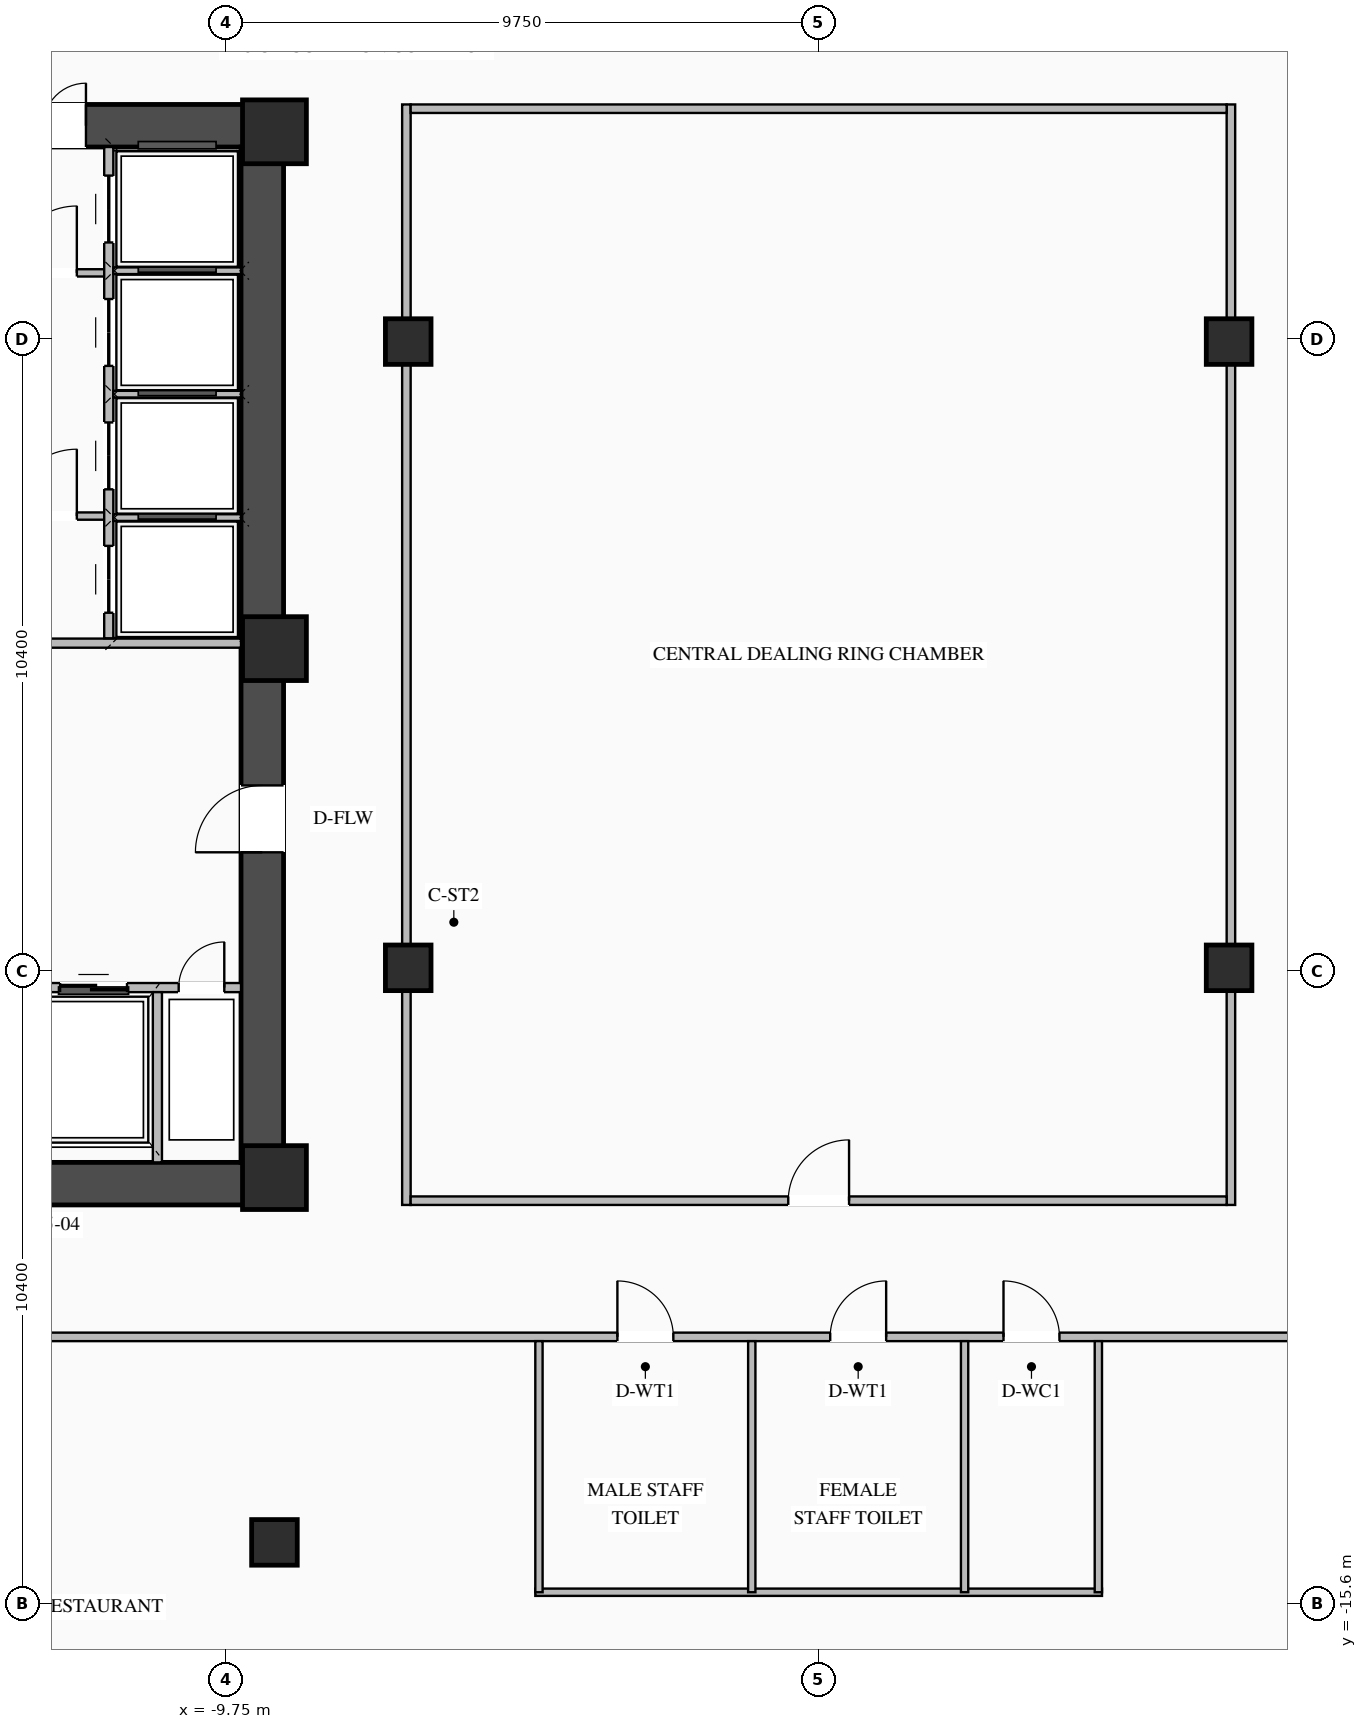
"""IFC4 building model, lengths in metres.
Left out: names, types, materials, properties, quantities, classifications, styles, units other than length and angle.
Written with IfcOpenShell. Run it as: python <this file> out.ifc"""

import sys

from ifc_helpers import new_model, si_unit, direction, frame, frame_2d, origin, origin_2d, place, context, subcontext, project, spatial, rectangle, i_section, extrude, element, fill, save


model = new_model("IFC4")
c1 = context("Model", 3, precision=1e-05, world=origin(), true_north=direction((0.0, 1.0)))
c2 = subcontext(c1, "Body", "Model", "MODEL_VIEW")
j1 = project(units=[si_unit("LENGTHUNIT", "METRE"), si_unit("PLANEANGLEUNIT", "RADIAN")], contexts=[c1])
p1 = place(None, origin())
s1 = spatial("IfcSite", under=j1, at=p1, CompositionType="ELEMENT")
p2 = place(p1, origin())
s2 = spatial("IfcBuilding", under=s1, at=p2, CompositionType="ELEMENT")
p3 = place(p2, frame((0.0, 0.0, 70.0)))
s3 = spatial("IfcBuildingStorey", under=s2, at=p3, CompositionType="ELEMENT", Elevation=70.0)
p4 = place(p3, frame((-19.05, -8.7, 0.0), z_axis=(0.0, 0.0, 1.0), x_axis=(1.0, 0.0, 0.0)))
e1 = element("IfcWall", 1, at=p4, inside=s3, PredefinedType="SHEAR", context=c2, shape_type="SweptSolid", body=[
    extrude(rectangle(XDim=10.25, YDim=0.7, at=frame_2d((5.125, 0.0))), origin(), (0.0, 0.0, 1.0), 4.02),
])
p5 = place(p3, frame((-19.05, 8.7, 0.0), z_axis=(0.0, 0.0, 1.0), x_axis=(1.0, 0.0, 0.0)))
e2 = element("IfcWall", 2, at=p5, inside=s3, PredefinedType="SHEAR", context=c2, shape_type="SweptSolid", body=[
    extrude(rectangle(XDim=10.25, YDim=0.7, at=frame_2d((5.125, 0.0))), origin(), (0.0, 0.0, 1.0), 4.02),
])
p6 = place(p5, frame((5.6, 0.0, 0.0)))
e3 = element("IfcOpeningElement", 3, at=p6, cuts=e2, PredefinedType="OPENING", context=c2, shape_type="SweptSolid", body=[
    extrude(rectangle(XDim=1.4, YDim=2.05, at=frame_2d((0.7, 1.025))), frame((0.0, 0.36, 0.0), z_axis=(0.0, -1.0, 0.0), x_axis=(1.0, 0.0, 0.0)), (0.0, 0.0, 1.0), 0.72),
])
p7 = place(p3, frame((-9.15, -8.35, 0.0), z_axis=(0.0, 0.0, 1.0), x_axis=(0.0, 1.0, 0.0)))
e4 = element("IfcWall", 4, at=p7, inside=s3, PredefinedType="SHEAR", context=c2, shape_type="SweptSolid", body=[
    extrude(rectangle(XDim=16.7, YDim=0.7, at=frame_2d((8.35, 0.0))), origin(), (0.0, 0.0, 1.0), 4.02),
])
p8 = place(p7, frame((5.1, 0.0, 0.0)))
e5 = element("IfcOpeningElement", 5, at=p8, cuts=e4, PredefinedType="OPENING", context=c2, shape_type="SweptSolid", body=[
    extrude(rectangle(XDim=1.1, YDim=2.08, at=frame_2d((0.55, 1.04))), frame((0.0, 0.36, 0.0), z_axis=(0.0, -1.0, 0.0), x_axis=(1.0, 0.0, 0.0)), (0.0, 0.0, 1.0), 0.72),
])
for number, where, z_axis, x_axis in (
    (6, (-8.95, -8.6, 0.0), (0.0, 0.0, 1.0), (1.0, 0.0, 0.0)),
    (7, (-8.95, 0.1, 0.0), (0.0, 0.0, 1.0), (1.0, 0.0, 0.0)),
    (8, (-8.95, 8.6, 0.0), (0.0, 0.0, 1.0), (1.0, 0.0, 0.0)),
):
    element("IfcColumn", number, at=place(p3, frame(where, z_axis=z_axis, x_axis=x_axis)), inside=s3, PredefinedType="COLUMN", context=c2, shape_type="SweptSolid", body=[
        extrude(rectangle(XDim=1.05, YDim=1.05, at=origin_2d()), origin(), (0.0, 0.0, 1.0), 4.2),
    ])
for number, where, z_axis, x_axis in (
    (9, (-6.75, -5.15, 0.0), (0.0, 0.0, 1.0), (1.0, 0.0, 0.0)),
    (10, (-6.75, 5.15, 0.0), (0.0, 0.0, 1.0), (1.0, 0.0, 0.0)),
    (11, (6.75, -5.15, 0.0), (0.0, 0.0, 1.0), (1.0, 0.0, 0.0)),
    (12, (6.75, 5.15, 0.0), (0.0, 0.0, 1.0), (1.0, 0.0, 0.0)),
    (13, (-8.95, -14.6, 0.0), (0.0, 0.0, 1.0), (1.0, 0.0, 0.0)),
):
    element("IfcColumn", number, at=place(p3, frame(where, z_axis=z_axis, x_axis=x_axis)), inside=s3, PredefinedType="COLUMN", context=c2, shape_type="SweptSolid", body=[
        extrude(i_section(OverallWidth=0.75, OverallDepth=0.75, WebThickness=0.03, FlangeThickness=0.044, at=origin_2d()), origin(), (0.0, 0.0, 1.0), 4.2),
    ])
p9 = place(p3, frame((-12.895, -5.475, 0.0), z_axis=(0.0, 0.0, 1.0), x_axis=(1.0, 0.0, 0.0)))
e14 = element("IfcWall", 14, at=p9, inside=s3, PredefinedType="STANDARD", context=c2, shape_type="SweptSolid", body=[
    extrude(rectangle(XDim=3.395, YDim=0.15, at=frame_2d((1.698, 0.0))), origin(), (0.0, 0.0, 1.0), 4.0),
])
p10 = place(p9, frame((0.42, 0.0, 0.0)))
e15 = element("IfcOpeningElement", 15, at=p10, cuts=e14, PredefinedType="OPENING", context=c2, shape_type="SweptSolid", body=[
    extrude(rectangle(XDim=1.1, YDim=2.15, at=frame_2d((0.55, 1.075))), frame((0.0, 0.085, 0.0), z_axis=(0.0, -1.0, 0.0), x_axis=(1.0, 0.0, 0.0)), (0.0, 0.0, 1.0), 0.17),
])
p11 = place(p9, frame((2.37, 0.0, 0.0)))
e16 = element("IfcOpeningElement", 16, at=p11, cuts=e14, PredefinedType="OPENING", context=c2, shape_type="SweptSolid", body=[
    extrude(rectangle(XDim=0.75, YDim=2.05, at=frame_2d((0.375, 1.025))), frame((0.0, 0.085, 0.0), z_axis=(0.0, -1.0, 0.0), x_axis=(1.0, 0.0, 0.0)), (0.0, 0.0, 1.0), 0.17),
])
p12 = place(p3, frame((-10.875, -8.35, 0.0), z_axis=(0.0, 0.0, 1.0), x_axis=(0.0, 1.0, 0.0)))
e17 = element("IfcWall", 17, at=p12, inside=s3, PredefinedType="STANDARD", context=c2, shape_type="SweptSolid", body=[
    extrude(rectangle(XDim=2.8, YDim=0.15, at=frame_2d((1.4, 0.0))), origin(), (0.0, 0.0, 1.0), 4.0),
])
p13 = place(p3, frame((-12.89, 0.19, 0.0), z_axis=(0.0, 0.0, 1.0), x_axis=(1.0, 0.0, 0.0)))
e18 = element("IfcWall", 18, at=p13, inside=s3, PredefinedType="STANDARD", context=c2, shape_type="SweptSolid", body=[
    extrude(rectangle(XDim=3.39, YDim=0.15, at=frame_2d((1.695, 0.0))), origin(), (0.0, 0.0, 1.0), 3.395),
])
p14 = place(p3, frame((-13.75, 2.28, 0.0), z_axis=(0.0, 0.0, 1.0), x_axis=(1.0, 0.0, 0.0)))
e19 = element("IfcWall", 19, at=p14, inside=s3, PredefinedType="STANDARD", context=c2, shape_type="SweptSolid", body=[
    extrude(rectangle(XDim=2.0, YDim=0.12, at=frame_2d((1.0, 0.0))), origin(), (0.0, 0.0, 1.0), 4.0),
])
p15 = place(p14, frame((0.45, 0.0, 0.0)))
e20 = element("IfcOpeningElement", 20, at=p15, cuts=e19, PredefinedType="OPENING", context=c2, shape_type="SweptSolid", body=[
    extrude(rectangle(XDim=1.1, YDim=2.1, at=frame_2d((0.55, 1.05))), frame((0.0, 0.07, 0.0), z_axis=(0.0, -1.0, 0.0), x_axis=(1.0, 0.0, 0.0)), (0.0, 0.0, 1.0), 0.14),
])
p16 = place(p3, frame((-13.75, 6.28, 0.0), z_axis=(0.0, 0.0, 1.0), x_axis=(1.0, 0.0, 0.0)))
e21 = element("IfcWall", 21, at=p16, inside=s3, PredefinedType="STANDARD", context=c2, shape_type="SweptSolid", body=[
    extrude(rectangle(XDim=2.0, YDim=0.12, at=frame_2d((1.0, 0.0))), origin(), (0.0, 0.0, 1.0), 4.0),
])
p17 = place(p16, frame((0.45, 0.0, 0.0)))
e22 = element("IfcOpeningElement", 22, at=p17, cuts=e21, PredefinedType="OPENING", context=c2, shape_type="SweptSolid", body=[
    extrude(rectangle(XDim=1.1, YDim=2.1, at=frame_2d((0.55, 1.05))), frame((0.0, 0.07, 0.0), z_axis=(0.0, -1.0, 0.0), x_axis=(1.0, 0.0, 0.0)), (0.0, 0.0, 1.0), 0.14),
])
p18 = place(p3, frame((-11.675, 0.27, 0.0), z_axis=(0.0, 0.0, 1.0), x_axis=(0.0, 1.0, 0.0)))
e23 = element("IfcWall", 23, at=p18, inside=s3, PredefinedType="STANDARD", context=c2, shape_type="SweptSolid", body=[
    extrude(rectangle(XDim=8.08, YDim=0.15, at=frame_2d((4.04, 0.0))), origin(), (0.0, 0.0, 1.0), 4.0),
])
p19 = place(p18, frame((0.42, 0.0, 0.0)))
e24 = element("IfcOpeningElement", 24, at=p19, cuts=e23, PredefinedType="OPENING", context=c2, shape_type="SweptSolid", body=[
    extrude(rectangle(XDim=1.1, YDim=2.1, at=frame_2d((0.55, 1.05))), frame((0.0, 0.085, 0.0), z_axis=(0.0, -1.0, 0.0), x_axis=(1.0, 0.0, 0.0)), (0.0, 0.0, 1.0), 0.17),
])
p20 = place(p18, frame((2.45, 0.0, 0.0)))
e25 = element("IfcOpeningElement", 25, at=p20, cuts=e23, PredefinedType="OPENING", context=c2, shape_type="SweptSolid", body=[
    extrude(rectangle(XDim=1.1, YDim=2.1, at=frame_2d((0.55, 1.05))), frame((0.0, 0.085, 0.0), z_axis=(0.0, -1.0, 0.0), x_axis=(1.0, 0.0, 0.0)), (0.0, 0.0, 1.0), 0.17),
])
p21 = place(p18, frame((4.48, 0.0, 0.0)))
e26 = element("IfcOpeningElement", 26, at=p21, cuts=e23, PredefinedType="OPENING", context=c2, shape_type="SweptSolid", body=[
    extrude(rectangle(XDim=1.1, YDim=2.1, at=frame_2d((0.55, 1.05))), frame((0.0, 0.085, 0.0), z_axis=(0.0, -1.0, 0.0), x_axis=(1.0, 0.0, 0.0)), (0.0, 0.0, 1.0), 0.17),
])
p22 = place(p18, frame((6.51, 0.0, 0.0)))
e27 = element("IfcOpeningElement", 27, at=p22, cuts=e23, PredefinedType="OPENING", context=c2, shape_type="SweptSolid", body=[
    extrude(rectangle(XDim=1.1, YDim=2.1, at=frame_2d((0.55, 1.05))), frame((0.0, 0.085, 0.0), z_axis=(0.0, -1.0, 0.0), x_axis=(1.0, 0.0, 0.0)), (0.0, 0.0, 1.0), 0.17),
])
for number, where, z_axis, x_axis in (
    (28, (-11.6, 2.255, 0.0), (0.0, 0.0, 1.0), (1.0, 0.0, 0.0)),
    (29, (-11.6, 4.285, 0.0), (0.0, 0.0, 1.0), (1.0, 0.0, 0.0)),
    (30, (-11.6, 6.315, 0.0), (0.0, 0.0, 1.0), (1.0, 0.0, 0.0)),
):
    element("IfcWall", number, at=place(p3, frame(where, z_axis=z_axis, x_axis=x_axis)), inside=s3, PredefinedType="STANDARD", context=c2, shape_type="SweptSolid", body=[
        extrude(rectangle(XDim=2.1, YDim=0.11, at=frame_2d((1.05, 0.0))), origin(), (0.0, 0.0, 1.0), 4.0),
    ])
p23 = place(p3, frame((-28.406, -11.22, 0.0), z_axis=(0.0, 0.0, 1.0), x_axis=(1.0, 0.0, 0.0)))
e31 = element("IfcWall", 31, at=p23, inside=s3, PredefinedType="STANDARD", context=c2, shape_type="SweptSolid", body=[
    extrude(rectangle(XDim=67.551, YDim=0.14, at=frame_2d((33.775, 0.0))), origin(), (0.0, 0.0, 1.0), 3.495),
])
p24 = place(p23, frame((25.096, 0.0, 0.0)))
e32 = element("IfcOpeningElement", 32, at=p24, cuts=e31, PredefinedType="OPENING", context=c2, shape_type="SweptSolid", body=[
    extrude(rectangle(XDim=0.92, YDim=2.08, at=frame_2d((0.46, 1.04))), frame((0.0, 0.08, 0.0), z_axis=(0.0, -1.0, 0.0), x_axis=(1.0, 0.0, 0.0)), (0.0, 0.0, 1.0), 0.16),
])
p25 = place(p23, frame((28.596, 0.0, 0.0)))
e33 = element("IfcOpeningElement", 33, at=p25, cuts=e31, PredefinedType="OPENING", context=c2, shape_type="SweptSolid", body=[
    extrude(rectangle(XDim=0.92, YDim=2.08, at=frame_2d((0.46, 1.04))), frame((0.0, 0.08, 0.0), z_axis=(0.0, -1.0, 0.0), x_axis=(1.0, 0.0, 0.0)), (0.0, 0.0, 1.0), 0.16),
])
p26 = place(p23, frame((31.446, 0.0, 0.0)))
e34 = element("IfcOpeningElement", 34, at=p26, cuts=e31, PredefinedType="OPENING", context=c2, shape_type="SweptSolid", body=[
    extrude(rectangle(XDim=0.92, YDim=2.08, at=frame_2d((0.46, 1.04))), frame((0.0, 0.08, 0.0), z_axis=(0.0, -1.0, 0.0), x_axis=(1.0, 0.0, 0.0)), (0.0, 0.0, 1.0), 0.16),
])
p27 = place(p23, frame((11.529, 0.0, 0.0)))
e35 = element("IfcOpeningElement", 35, at=p27, cuts=e31, PredefinedType="OPENING", context=c2, shape_type="SweptSolid", body=[
    extrude(rectangle(XDim=1.0, YDim=2.08, at=frame_2d((0.5, 1.04))), frame((0.0, 0.08, 0.0), z_axis=(0.0, -1.0, 0.0), x_axis=(1.0, 0.0, 0.0)), (0.0, 0.0, 1.0), 0.16),
])
p28 = place(p23, frame((49.653, 0.0, 0.0)))
e36 = element("IfcOpeningElement", 36, at=p28, cuts=e31, PredefinedType="OPENING", context=c2, shape_type="SweptSolid", body=[
    extrude(rectangle(XDim=1.0, YDim=2.08, at=frame_2d((0.5, 1.04))), frame((0.0, 0.08, 0.0), z_axis=(0.0, -1.0, 0.0), x_axis=(1.0, 0.0, 0.0)), (0.0, 0.0, 1.0), 0.16),
])
p29 = place(p3, frame((-4.66, -15.42, 0.0), z_axis=(0.0, 0.0, 1.0), x_axis=(1.0, 0.0, 0.0)))
e37 = element("IfcWall", 37, at=p29, inside=s3, PredefinedType="STANDARD", context=c2, shape_type="SweptSolid", body=[
    extrude(rectangle(XDim=9.32, YDim=0.12, at=frame_2d((4.66, 0.0))), origin(), (0.0, 0.0, 1.0), 4.0),
])
for number, where, z_axis, x_axis in (
    (38, (-4.6, -15.42, 0.0), (0.0, 0.0, 1.0), (0.0, 1.0, 0.0)),
    (39, (-1.1, -15.42, 0.0), (0.0, 0.0, 1.0), (0.0, 1.0, 0.0)),
    (40, (2.4, -15.42, 0.0), (0.0, 0.0, 1.0), (0.0, 1.0, 0.0)),
    (41, (4.6, -15.42, 0.0), (0.0, 0.0, 1.0), (0.0, 1.0, 0.0)),
):
    element("IfcWall", number, at=place(p3, frame(where, z_axis=z_axis, x_axis=x_axis)), inside=s3, PredefinedType="STANDARD", context=c2, shape_type="SweptSolid", body=[
        extrude(rectangle(XDim=4.13, YDim=0.12, at=frame_2d((2.065, 0.0))), origin(), (0.0, 0.0, 1.0), 4.0),
    ])
for number, where, z_axis, x_axis in (
    (42, (-6.78, -9.05, 0.0), (0.0, 0.0, 1.0), (0.0, 1.0, 0.0)),
    (43, (6.78, -9.05, 0.0), (0.0, 0.0, 1.0), (0.0, 1.0, 0.0)),
):
    element("IfcWall", number, at=place(p3, frame(where, z_axis=z_axis, x_axis=x_axis)), inside=s3, PredefinedType="STANDARD", context=c2, shape_type="SweptSolid", body=[
        extrude(rectangle(XDim=18.1, YDim=0.14, at=frame_2d((9.05, 0.0))), origin(), (0.0, 0.0, 1.0), 3.395),
    ])
p30 = place(p3, frame((-6.71, -8.98, 0.0), z_axis=(0.0, 0.0, 1.0), x_axis=(1.0, 0.0, 0.0)))
e44 = element("IfcWall", 44, at=p30, inside=s3, PredefinedType="STANDARD", context=c2, shape_type="SweptSolid", body=[
    extrude(rectangle(XDim=13.42, YDim=0.14, at=frame_2d((6.71, 0.0))), origin(), (0.0, 0.0, 1.0), 4.0),
])
p31 = place(p30, frame((6.21, 0.0, 0.0)))
e45 = element("IfcOpeningElement", 45, at=p31, cuts=e44, PredefinedType="OPENING", context=c2, shape_type="SweptSolid", body=[
    extrude(rectangle(XDim=1.0, YDim=2.08, at=frame_2d((0.5, 1.04))), frame((0.0, 0.08, 0.0), z_axis=(0.0, -1.0, 0.0), x_axis=(1.0, 0.0, 0.0)), (0.0, 0.0, 1.0), 0.16),
])
p32 = place(p3, frame((-6.71, 8.98, 0.0), z_axis=(0.0, 0.0, 1.0), x_axis=(1.0, 0.0, 0.0)))
e46 = element("IfcWall", 46, at=p32, inside=s3, PredefinedType="STANDARD", context=c2, shape_type="SweptSolid", body=[
    extrude(rectangle(XDim=13.42, YDim=0.14, at=frame_2d((6.71, 0.0))), origin(), (0.0, 0.0, 1.0), 4.0),
])
p33 = place(p10, origin())
e47 = element("IfcDoor", 47, at=p33, inside=s3, OperationType="DOUBLE_DOOR_SLIDING", PredefinedType="DOOR", context=c2, shape_type="SweptSolid", body=[
    extrude(rectangle(XDim=1.1, YDim=2.15, at=frame_2d((0.55, 1.075))), frame((0.0, 0.025, 0.0), z_axis=(0.0, -1.0, 0.0), x_axis=(1.0, 0.0, 0.0)), (0.0, 0.0, 1.0), 0.05),
])
fill(e15, e47)
p34 = place(p11, origin())
e48 = element("IfcDoor", 48, at=p34, inside=s3, OperationType="SINGLE_SWING_RIGHT", PredefinedType="DOOR", context=c2, shape_type="SweptSolid", body=[
    extrude(rectangle(XDim=0.75, YDim=2.05, at=frame_2d((0.375, 1.025))), frame((0.0, 0.025, 0.0), z_axis=(0.0, -1.0, 0.0), x_axis=(1.0, 0.0, 0.0)), (0.0, 0.0, 1.0), 0.05),
])
fill(e16, e48)
p35 = place(p8, origin())
e49 = element("IfcDoor", 49, at=p35, inside=s3, OperationType="SINGLE_SWING_LEFT", PredefinedType="DOOR", context=c2, shape_type="SweptSolid", body=[
    extrude(rectangle(XDim=1.1, YDim=2.08, at=frame_2d((0.55, 1.04))), frame((0.0, 0.305, 0.0), z_axis=(0.0, -1.0, 0.0), x_axis=(1.0, 0.0, 0.0)), (0.0, 0.0, 1.0), 0.05),
])
fill(e5, e49)
p36 = place(p15, origin())
e50 = element("IfcDoor", 50, at=p36, inside=s3, OperationType="SINGLE_SWING_RIGHT", PredefinedType="DOOR", context=c2, shape_type="SweptSolid", body=[
    extrude(rectangle(XDim=1.1, YDim=2.1, at=frame_2d((0.55, 1.05))), frame((0.0, 0.025, 0.0), z_axis=(0.0, -1.0, 0.0), x_axis=(1.0, 0.0, 0.0)), (0.0, 0.0, 1.0), 0.05),
])
fill(e20, e50)
p37 = place(p17, origin())
e51 = element("IfcDoor", 51, at=p37, inside=s3, OperationType="SINGLE_SWING_RIGHT", PredefinedType="DOOR", context=c2, shape_type="SweptSolid", body=[
    extrude(rectangle(XDim=1.1, YDim=2.1, at=frame_2d((0.55, 1.05))), frame((0.0, 0.025, 0.0), z_axis=(0.0, -1.0, 0.0), x_axis=(1.0, 0.0, 0.0)), (0.0, 0.0, 1.0), 0.05),
])
fill(e22, e51)
p38 = place(p6, origin())
e52 = element("IfcDoor", 52, at=p38, inside=s3, OperationType="DOUBLE_DOOR_SINGLE_SWING", PredefinedType="DOOR", context=c2, shape_type="SweptSolid", body=[
    extrude(rectangle(XDim=1.4, YDim=2.05, at=frame_2d((0.7, 1.025))), frame((0.0, 0.295, 0.0), z_axis=(0.0, -1.0, 0.0), x_axis=(1.0, 0.0, 0.0)), (0.0, 0.0, 1.0), 0.05),
])
fill(e3, e52)
p39 = place(p19, origin())
e53 = element("IfcDoor", 53, at=p39, inside=s3, OperationType="DOUBLE_DOOR_SLIDING", PredefinedType="DOOR", context=c2, shape_type="SweptSolid", body=[
    extrude(rectangle(XDim=1.1, YDim=2.1, at=frame_2d((0.55, 1.05))), frame((0.0, 0.025, 0.0), z_axis=(0.0, -1.0, 0.0), x_axis=(1.0, 0.0, 0.0)), (0.0, 0.0, 1.0), 0.05),
])
fill(e24, e53)
p40 = place(p20, origin())
e54 = element("IfcDoor", 54, at=p40, inside=s3, OperationType="DOUBLE_DOOR_SLIDING", PredefinedType="DOOR", context=c2, shape_type="SweptSolid", body=[
    extrude(rectangle(XDim=1.1, YDim=2.1, at=frame_2d((0.55, 1.05))), frame((0.0, 0.025, 0.0), z_axis=(0.0, -1.0, 0.0), x_axis=(1.0, 0.0, 0.0)), (0.0, 0.0, 1.0), 0.05),
])
fill(e25, e54)
p41 = place(p21, origin())
e55 = element("IfcDoor", 55, at=p41, inside=s3, OperationType="DOUBLE_DOOR_SLIDING", PredefinedType="DOOR", context=c2, shape_type="SweptSolid", body=[
    extrude(rectangle(XDim=1.1, YDim=2.1, at=frame_2d((0.55, 1.05))), frame((0.0, 0.025, 0.0), z_axis=(0.0, -1.0, 0.0), x_axis=(1.0, 0.0, 0.0)), (0.0, 0.0, 1.0), 0.05),
])
fill(e26, e55)
p42 = place(p22, origin())
e56 = element("IfcDoor", 56, at=p42, inside=s3, OperationType="DOUBLE_DOOR_SLIDING", PredefinedType="DOOR", context=c2, shape_type="SweptSolid", body=[
    extrude(rectangle(XDim=1.1, YDim=2.1, at=frame_2d((0.55, 1.05))), frame((0.0, 0.025, 0.0), z_axis=(0.0, -1.0, 0.0), x_axis=(1.0, 0.0, 0.0)), (0.0, 0.0, 1.0), 0.05),
])
fill(e27, e56)
p43 = place(p24, origin())
e57 = element("IfcDoor", 57, at=p43, inside=s3, OperationType="SINGLE_SWING_LEFT", PredefinedType="DOOR", context=c2, shape_type="SweptSolid", body=[
    extrude(rectangle(XDim=0.92, YDim=2.08, at=frame_2d((0.46, 1.04))), frame((0.0, 0.025, 0.0), z_axis=(0.0, -1.0, 0.0), x_axis=(1.0, 0.0, 0.0)), (0.0, 0.0, 1.0), 0.05),
])
fill(e32, e57)
p44 = place(p25, origin())
e58 = element("IfcDoor", 58, at=p44, inside=s3, OperationType="SINGLE_SWING_RIGHT", PredefinedType="DOOR", context=c2, shape_type="SweptSolid", body=[
    extrude(rectangle(XDim=0.92, YDim=2.08, at=frame_2d((0.46, 1.04))), frame((0.0, 0.025, 0.0), z_axis=(0.0, -1.0, 0.0), x_axis=(1.0, 0.0, 0.0)), (0.0, 0.0, 1.0), 0.05),
])
fill(e33, e58)
p45 = place(p26, origin())
e59 = element("IfcDoor", 59, at=p45, inside=s3, OperationType="SINGLE_SWING_LEFT", PredefinedType="DOOR", context=c2, shape_type="SweptSolid", body=[
    extrude(rectangle(XDim=0.92, YDim=2.08, at=frame_2d((0.46, 1.04))), frame((0.0, 0.025, 0.0), z_axis=(0.0, -1.0, 0.0), x_axis=(1.0, 0.0, 0.0)), (0.0, 0.0, 1.0), 0.05),
])
fill(e34, e59)
p46 = place(p31, origin())
e60 = element("IfcDoor", 60, at=p46, inside=s3, OperationType="SINGLE_SWING_RIGHT", PredefinedType="DOOR", context=c2, shape_type="SweptSolid", body=[
    extrude(rectangle(XDim=1.0, YDim=2.08, at=frame_2d((0.5, 1.04))), frame((0.0, 0.025, 0.0), z_axis=(0.0, -1.0, 0.0), x_axis=(1.0, 0.0, 0.0)), (0.0, 0.0, 1.0), 0.05),
])
fill(e45, e60)
save(model, sys.argv[1])
